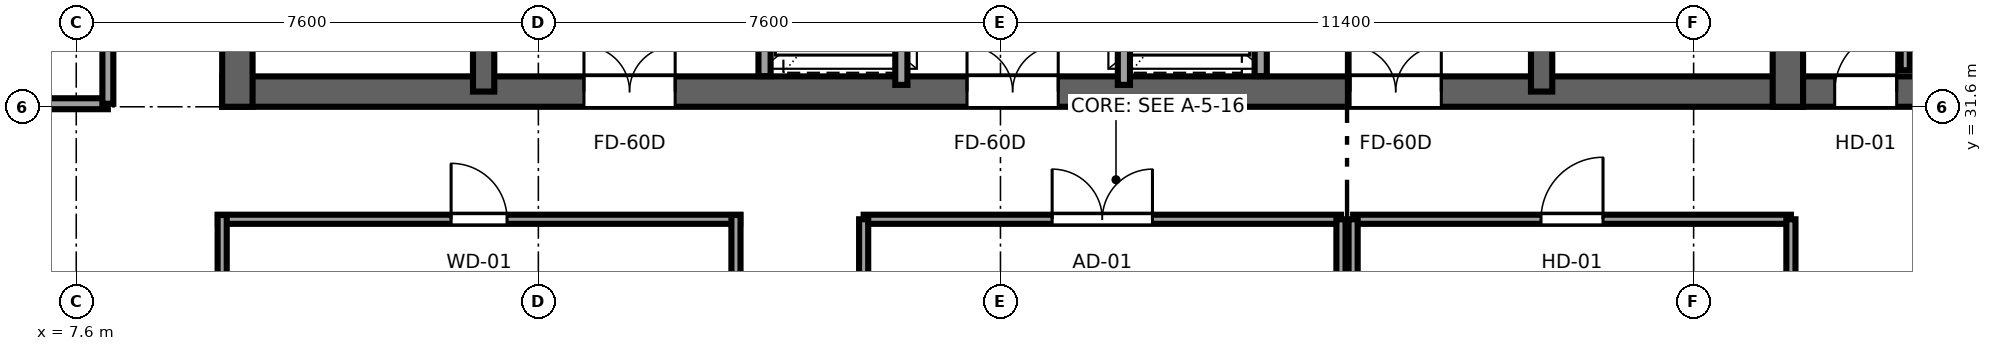
"""IFC4 building model, lengths in metres.
Left out: names, types, materials, properties, quantities, classifications, styles, units other than length and angle.
Written with IfcOpenShell. Run it as: python <this file> out.ifc"""

import sys

from ifc_helpers import new_model, si_unit, direction, frame, frame_2d, origin, place, context, subcontext, project, spatial, rectangle, extrude, source, transform, mapped, element, fill, save


model = new_model("IFC4")
c1 = context("Model", 3, precision=1e-05, world=origin(), true_north=direction((0.0, 1.0)))
c2 = subcontext(c1, "Body", "Model", "MODEL_VIEW")
j1 = project(units=[si_unit("LENGTHUNIT", "METRE"), si_unit("PLANEANGLEUNIT", "RADIAN")], contexts=[c1])
p1 = place(None, origin())
s1 = spatial("IfcSite", under=j1, at=p1, CompositionType="ELEMENT")
p2 = place(p1, origin())
s2 = spatial("IfcBuilding", under=s1, at=p2, CompositionType="ELEMENT")
p3 = place(p2, frame((0.0, 0.0, 231.0)))
s3 = spatial("IfcBuildingStorey", under=s2, at=p3, CompositionType="ELEMENT", Elevation=231.0)
p4 = place(p3, frame((10.0, 31.85, 0.0), z_axis=(0.0, 0.0, 1.0), x_axis=(1.0, 0.0, 0.0)))
e1 = element("IfcWall", 1, at=p4, inside=s3, PredefinedType="SHEAR", context=c2, shape_type="SweptSolid", body=[
    extrude(rectangle(XDim=26.0, YDim=0.5, at=frame_2d((13.0, 0.0))), origin(), (0.0, 0.0, 1.0), 3.55),
])
p5 = place(p4, frame((7.45, 0.0, 0.0), z_axis=(0.0, 0.0, 1.0), x_axis=(-1.0, 0.0, 0.0)))
e2 = element("IfcOpeningElement", 2, at=p5, cuts=e1, PredefinedType="OPENING", context=c2, shape_type="SweptSolid", body=[
    extrude(rectangle(XDim=1.5, YDim=2.04, at=frame_2d((0.75, 1.02))), frame((0.0, 0.26, 0.0), z_axis=(0.0, -1.0, 0.0), x_axis=(1.0, 0.0, 0.0)), (0.0, 0.0, 1.0), 0.52),
])
p6 = place(p4, frame((13.75, 0.0, 0.0), z_axis=(0.0, 0.0, 1.0), x_axis=(-1.0, 0.0, 0.0)))
e3 = element("IfcOpeningElement", 3, at=p6, cuts=e1, PredefinedType="OPENING", context=c2, shape_type="SweptSolid", body=[
    extrude(rectangle(XDim=1.5, YDim=2.04, at=frame_2d((0.75, 1.02))), frame((0.0, 0.26, 0.0), z_axis=(0.0, -1.0, 0.0), x_axis=(1.0, 0.0, 0.0)), (0.0, 0.0, 1.0), 0.52),
])
p7 = place(p4, frame((20.05, 0.0, 0.0), z_axis=(0.0, 0.0, 1.0), x_axis=(-1.0, 0.0, 0.0)))
e4 = element("IfcOpeningElement", 4, at=p7, cuts=e1, PredefinedType="OPENING", context=c2, shape_type="SweptSolid", body=[
    extrude(rectangle(XDim=1.5, YDim=2.04, at=frame_2d((0.75, 1.02))), frame((0.0, 0.26, 0.0), z_axis=(0.0, -1.0, 0.0), x_axis=(1.0, 0.0, 0.0)), (0.0, 0.0, 1.0), 0.52),
])
for number, where, z_axis, x_axis in (
    (5, (10.25, 31.6, 0.0), (0.0, 0.0, 1.0), (0.0, 1.0, 0.0)),
    (6, (35.75, 31.6, 0.0), (0.0, 0.0, 1.0), (0.0, 1.0, 0.0)),
):
    element("IfcWall", number, at=place(p3, frame(where, z_axis=z_axis, x_axis=x_axis)), inside=s3, PredefinedType="SHEAR", context=c2, shape_type="SweptSolid", body=[
        extrude(rectangle(XDim=13.6, YDim=0.5, at=frame_2d((6.8, 0.0))), origin(), (0.0, 0.0, 1.0), 3.55),
    ])
p8 = place(p3, frame((14.3, 31.85, 0.0), z_axis=(0.0, 0.0, 1.0), x_axis=(0.0, 1.0, 0.0)))
e7 = element("IfcWall", 7, at=p8, inside=s3, PredefinedType="SHEAR", context=c2, shape_type="SweptSolid", body=[
    extrude(rectangle(XDim=13.1, YDim=0.35, at=frame_2d((6.55, 0.0))), origin(), (0.0, 0.0, 1.0), 3.55),
])
p9 = place(p8, frame((0.7, 0.0, 0.0)))
e8 = element("IfcOpeningElement", 8, at=p9, cuts=e7, PredefinedType="OPENING", context=c2, shape_type="SweptSolid", body=[
    extrude(rectangle(XDim=1.1, YDim=2.12, at=frame_2d((0.55, 1.06))), frame((0.0, 0.185, 0.0), z_axis=(0.0, -1.0, 0.0), x_axis=(1.0, 0.0, 0.0)), (0.0, 0.0, 1.0), 0.37),
])
p10 = place(p3, frame((31.7, 31.85, 0.0), z_axis=(0.0, 0.0, 1.0), x_axis=(0.0, 1.0, 0.0)))
e9 = element("IfcWall", 9, at=p10, inside=s3, PredefinedType="SHEAR", context=c2, shape_type="SweptSolid", body=[
    extrude(rectangle(XDim=13.1, YDim=0.35, at=frame_2d((6.55, 0.0))), origin(), (0.0, 0.0, 1.0), 3.55),
])
p11 = place(p10, frame((1.8, 0.0, 0.0), z_axis=(0.0, 0.0, 1.0), x_axis=(-1.0, 0.0, 0.0)))
e10 = element("IfcOpeningElement", 10, at=p11, cuts=e9, PredefinedType="OPENING", context=c2, shape_type="SweptSolid", body=[
    extrude(rectangle(XDim=1.1, YDim=2.12, at=frame_2d((0.55, 1.06))), frame((0.0, 0.185, 0.0), z_axis=(0.0, -1.0, 0.0), x_axis=(1.0, 0.0, 0.0)), (0.0, 0.0, 1.0), 0.37),
])
p12 = place(p3, frame((36.0, 31.85, 0.0), z_axis=(0.0, 0.0, 1.0), x_axis=(1.0, 0.0, 0.0)))
e11 = element("IfcWall", 11, at=p12, inside=s3, PredefinedType="SHEAR", context=c2, shape_type="SweptSolid", body=[
    extrude(rectangle(XDim=3.8, YDim=0.5, at=frame_2d((1.9, 0.0))), origin(), (0.0, 0.0, 1.0), 3.55),
])
p13 = place(p12, frame((1.54, 0.0, 0.0), z_axis=(0.0, 0.0, 1.0), x_axis=(-1.0, 0.0, 0.0)))
e12 = element("IfcOpeningElement", 12, at=p13, cuts=e11, PredefinedType="OPENING", context=c2, shape_type="SweptSolid", body=[
    extrude(rectangle(XDim=1.02, YDim=2.03, at=frame_2d((0.51, 1.015))), frame((0.0, 0.26, 0.0), z_axis=(0.0, -1.0, 0.0), x_axis=(1.0, 0.0, 0.0)), (0.0, 0.0, 1.0), 0.52),
])
for number, where, z_axis, x_axis in (
    (13, (18.92, 32.104, 0.0), (0.0, 0.0, 1.0), (0.0, 1.0, 0.0)),
    (14, (27.08, 32.104, 0.0), (0.0, 0.0, 1.0), (0.0, 1.0, 0.0)),
):
    element("IfcWall", number, at=place(p3, frame(where, z_axis=z_axis, x_axis=x_axis)), inside=s3, PredefinedType="SOLIDWALL", context=c2, shape_type="SweptSolid", body=[
        extrude(rectangle(XDim=4.046, YDim=0.2, at=frame_2d((2.023, 0.0))), origin(), (0.0, 0.0, 1.0), 3.37),
    ])
p14 = place(p3, frame((21.17, 31.96, 0.0), z_axis=(0.0, 0.0, 1.0), x_axis=(0.0, 1.0, 0.0)))
e15 = element("IfcWall", 15, at=p14, inside=s3, PredefinedType="SOLIDWALL", context=c2, shape_type="SweptSolid", body=[
    extrude(rectangle(XDim=5.08, YDim=0.2, at=frame_2d((2.54, 0.0))), origin(), (0.0, 0.0, 1.0), 3.37),
])
p15 = place(p14, frame((0.74, 0.0, 0.0)))
e16 = element("IfcOpeningElement", 16, at=p15, cuts=e15, PredefinedType="OPENING", context=c2, shape_type="SweptSolid", body=[
    extrude(rectangle(XDim=1.1, YDim=2.12, at=frame_2d((0.55, 1.06))), frame((0.0, 0.11, 0.0), z_axis=(0.0, -1.0, 0.0), x_axis=(1.0, 0.0, 0.0)), (0.0, 0.0, 1.0), 0.22),
])
p16 = place(p14, frame((3.24, 0.0, 0.0)))
e17 = element("IfcOpeningElement", 17, at=p16, cuts=e15, PredefinedType="OPENING", context=c2, shape_type="SweptSolid", body=[
    extrude(rectangle(XDim=1.1, YDim=2.12, at=frame_2d((0.55, 1.06))), frame((0.0, 0.11, 0.0), z_axis=(0.0, -1.0, 0.0), x_axis=(1.0, 0.0, 0.0)), (0.0, 0.0, 1.0), 0.22),
])
p17 = place(p3, frame((24.83, 31.96, 0.0), z_axis=(0.0, 0.0, 1.0), x_axis=(0.0, 1.0, 0.0)))
e18 = element("IfcWall", 18, at=p17, inside=s3, PredefinedType="SOLIDWALL", context=c2, shape_type="SweptSolid", body=[
    extrude(rectangle(XDim=5.08, YDim=0.2, at=frame_2d((2.54, 0.0))), origin(), (0.0, 0.0, 1.0), 3.37),
])
p18 = place(p17, frame((0.74, 0.0, 0.0)))
e19 = element("IfcOpeningElement", 19, at=p18, cuts=e18, PredefinedType="OPENING", context=c2, shape_type="SweptSolid", body=[
    extrude(rectangle(XDim=1.1, YDim=2.12, at=frame_2d((0.55, 1.06))), frame((0.0, 0.11, 0.0), z_axis=(0.0, -1.0, 0.0), x_axis=(1.0, 0.0, 0.0)), (0.0, 0.0, 1.0), 0.22),
])
p19 = place(p17, frame((3.24, 0.0, 0.0)))
e20 = element("IfcOpeningElement", 20, at=p19, cuts=e18, PredefinedType="OPENING", context=c2, shape_type="SweptSolid", body=[
    extrude(rectangle(XDim=1.1, YDim=2.12, at=frame_2d((0.55, 1.06))), frame((0.0, 0.11, 0.0), z_axis=(0.0, -1.0, 0.0), x_axis=(1.0, 0.0, 0.0)), (0.0, 0.0, 1.0), 0.22),
])
p20 = place(p3, frame((37.68, 32.2, 0.0), z_axis=(0.0, 0.0, 1.0), x_axis=(0.0, 1.0, 0.0)))
e21 = element("IfcWall", 21, at=p20, inside=s3, PredefinedType="PARTITIONING", context=c2, shape_type="SweptSolid", body=[
    extrude(rectangle(XDim=4.0, YDim=0.15, at=frame_2d((2.0, 0.0))), origin(), (0.0, 0.0, 1.0), 3.37),
])
p21 = place(p20, frame((1.49, 0.0, 0.0)))
e22 = element("IfcOpeningElement", 22, at=p21, cuts=e21, PredefinedType="OPENING", context=c2, shape_type="SweptSolid", body=[
    extrude(rectangle(XDim=1.02, YDim=2.03, at=frame_2d((0.51, 1.015))), frame((0.0, 0.085, 0.0), z_axis=(0.0, -1.0, 0.0), x_axis=(1.0, 0.0, 0.0)), (0.0, 0.0, 1.0), 0.17),
])
p22 = place(p3, frame((3.005, 31.65, 0.0), z_axis=(0.0, 0.0, 1.0), x_axis=(1.0, 0.0, 0.0)))
e23 = element("IfcWall", 23, at=p22, inside=s3, PredefinedType="PARTITIONING", context=c2, shape_type="SweptSolid", body=[
    extrude(rectangle(XDim=5.115, YDim=0.18, at=frame_2d((2.558, 0.0))), origin(), (0.0, 0.0, 1.0), 3.37),
])
p23 = place(p3, frame((8.12, 31.65, 0.0), z_axis=(0.0, 0.0, 1.0), x_axis=(0.0, 1.0, 0.0)))
e24 = element("IfcWall", 24, at=p23, inside=s3, PredefinedType="PARTITIONING", context=c2, shape_type="SweptSolid", body=[
    extrude(rectangle(XDim=4.95, YDim=0.18, at=frame_2d((2.475, 0.0))), origin(), (0.0, 0.0, 1.0), 3.37),
])
p24 = place(p23, frame((3.0, 0.0, 0.0)))
e25 = element("IfcOpeningElement", 25, at=p24, cuts=e24, PredefinedType="OPENING", context=c2, shape_type="SweptSolid", body=[
    extrude(rectangle(XDim=1.65, YDim=2.15, at=frame_2d((0.825, 1.075))), frame((0.0, 0.1, 0.0), z_axis=(0.0, -1.0, 0.0), x_axis=(1.0, 0.0, 0.0)), (0.0, 0.0, 1.0), 0.2),
])
p25 = place(p3, frame((9.93, 29.75, 0.0), z_axis=(0.0, 0.0, 1.0), x_axis=(1.0, 0.0, 0.0)))
e26 = element("IfcWall", 26, at=p25, inside=s3, PredefinedType="PARTITIONING", context=c2, shape_type="SweptSolid", body=[
    extrude(rectangle(XDim=8.59, YDim=0.15, at=frame_2d((4.295, 0.0))), origin(), (0.0, 0.0, 1.0), 3.37),
])
p26 = place(p25, frame((3.835, 0.0, 0.0)))
e27 = element("IfcOpeningElement", 27, at=p26, cuts=e26, PredefinedType="OPENING", context=c2, shape_type="SweptSolid", body=[
    extrude(rectangle(XDim=0.92, YDim=2.01, at=frame_2d((0.46, 1.005))), frame((0.0, 0.085, 0.0), z_axis=(0.0, -1.0, 0.0), x_axis=(1.0, 0.0, 0.0)), (0.0, 0.0, 1.0), 0.17),
])
for number, where, z_axis, x_axis in (
    (28, (10.0, 27.03, 0.0), (0.0, 0.0, 1.0), (0.0, 1.0, 0.0)),
    (29, (18.45, 27.03, 0.0), (0.0, 0.0, 1.0), (0.0, 1.0, 0.0)),
):
    element("IfcWall", number, at=place(p3, frame(where, z_axis=z_axis, x_axis=x_axis)), inside=s3, PredefinedType="PARTITIONING", context=c2, shape_type="SweptSolid", body=[
        extrude(rectangle(XDim=2.79, YDim=0.15, at=frame_2d((1.395, 0.0))), origin(), (0.0, 0.0, 1.0), 3.37),
    ])
p27 = place(p3, frame((20.55, 29.75, 0.0), z_axis=(0.0, 0.0, 1.0), x_axis=(1.0, 0.0, 0.0)))
e30 = element("IfcWall", 30, at=p27, inside=s3, PredefinedType="PARTITIONING", context=c2, shape_type="SweptSolid", body=[
    extrude(rectangle(XDim=7.85, YDim=0.15, at=frame_2d((3.925, 0.0))), origin(), (0.0, 0.0, 1.0), 3.37),
])
p28 = place(p27, frame((3.1, 0.0, 0.0)))
e31 = element("IfcOpeningElement", 31, at=p28, cuts=e30, PredefinedType="OPENING", context=c2, shape_type="SweptSolid", body=[
    extrude(rectangle(XDim=1.65, YDim=2.15, at=frame_2d((0.825, 1.075))), frame((0.0, 0.085, 0.0), z_axis=(0.0, -1.0, 0.0), x_axis=(1.0, 0.0, 0.0)), (0.0, 0.0, 1.0), 0.17),
])
p29 = place(p3, frame((20.55, 25.0, 0.0), z_axis=(0.0, 0.0, 1.0), x_axis=(0.0, 1.0, 0.0)))
e32 = element("IfcWall", 32, at=p29, inside=s3, PredefinedType="PARTITIONING", context=c2, shape_type="SweptSolid", body=[
    extrude(rectangle(XDim=4.75, YDim=0.15, at=frame_2d((2.375, 0.0))), origin(), (0.0, 0.0, 1.0), 3.37),
])
p30 = place(p3, frame((28.4, 25.0, 0.0), z_axis=(0.0, 0.0, 1.0), x_axis=(0.0, 1.0, 0.0)))
e33 = element("IfcWall", 33, at=p30, inside=s3, PredefinedType="PARTITIONING", context=c2, shape_type="SweptSolid", body=[
    extrude(rectangle(XDim=4.75, YDim=0.15, at=frame_2d((2.375, 0.0))), origin(), (0.0, 0.0, 1.0), 2.758),
])
p31 = place(p3, frame((28.6, 29.75, 0.0), z_axis=(0.0, 0.0, 1.0), x_axis=(1.0, 0.0, 0.0)))
e34 = element("IfcWall", 34, at=p31, inside=s3, PredefinedType="PARTITIONING", context=c2, shape_type="SweptSolid", body=[
    extrude(rectangle(XDim=7.2, YDim=0.15, at=frame_2d((3.6, 0.0))), origin(), (0.0, 0.0, 1.0), 3.37),
])
p32 = place(p31, frame((3.09, 0.0, 0.0)))
e35 = element("IfcOpeningElement", 35, at=p32, cuts=e34, PredefinedType="OPENING", context=c2, shape_type="SweptSolid", body=[
    extrude(rectangle(XDim=1.02, YDim=2.03, at=frame_2d((0.51, 1.015))), frame((0.0, 0.085, 0.0), z_axis=(0.0, -1.0, 0.0), x_axis=(1.0, 0.0, 0.0)), (0.0, 0.0, 1.0), 0.17),
])
p33 = place(p3, frame((28.6, 25.0, 0.0), z_axis=(0.0, 0.0, 1.0), x_axis=(0.0, 1.0, 0.0)))
e36 = element("IfcWall", 36, at=p33, inside=s3, PredefinedType="PARTITIONING", context=c2, shape_type="SweptSolid", body=[
    extrude(rectangle(XDim=4.75, YDim=0.15, at=frame_2d((2.375, 0.0))), origin(), (0.0, 0.0, 1.0), 2.758),
])
p34 = place(p3, frame((35.8, 25.0, 0.0), z_axis=(0.0, 0.0, 1.0), x_axis=(0.0, 1.0, 0.0)))
e37 = element("IfcWall", 37, at=p34, inside=s3, PredefinedType="PARTITIONING", context=c2, shape_type="SweptSolid", body=[
    extrude(rectangle(XDim=4.75, YDim=0.15, at=frame_2d((2.375, 0.0))), origin(), (0.0, 0.0, 1.0), 3.37),
])
m1 = source(origin(), c2, "Body", "SweptSolid", [
    extrude(rectangle(XDim=1.5, YDim=2.04, at=frame_2d((0.75, 1.02))), frame((0.0, 0.025, 0.0), z_axis=(0.0, -1.0, 0.0), x_axis=(1.0, 0.0, 0.0)), (0.0, 0.0, 1.0), 0.05),
])
p35 = place(p5, origin())
e38 = element("IfcDoor", 38, at=p35, inside=s3, OperationType="DOUBLE_DOOR_SINGLE_SWING", PredefinedType="DOOR", context=c2, shape_type="MappedRepresentation", body=[
    mapped(m1, transform((0.0, 0.0, 0.0), x_axis=(1.0, 0.0, 0.0), y_axis=(0.0, 1.0, 0.0), z_axis=(0.0, 0.0, 1.0), scale=1.0)),
])
fill(e2, e38)
p36 = place(p6, origin())
e39 = element("IfcDoor", 39, at=p36, inside=s3, OperationType="DOUBLE_DOOR_SINGLE_SWING", PredefinedType="DOOR", context=c2, shape_type="MappedRepresentation", body=[
    mapped(m1, transform((0.0, 0.0, 0.0), x_axis=(1.0, 0.0, 0.0), y_axis=(0.0, 1.0, 0.0), z_axis=(0.0, 0.0, 1.0), scale=1.0)),
])
fill(e3, e39)
p37 = place(p7, origin())
e40 = element("IfcDoor", 40, at=p37, inside=s3, OperationType="DOUBLE_DOOR_SINGLE_SWING", PredefinedType="DOOR", context=c2, shape_type="MappedRepresentation", body=[
    mapped(m1, transform((0.0, 0.0, 0.0), x_axis=(1.0, 0.0, 0.0), y_axis=(0.0, 1.0, 0.0), z_axis=(0.0, 0.0, 1.0), scale=1.0)),
])
fill(e4, e40)
m2 = source(origin(), c2, "Body", "SweptSolid", [
    extrude(rectangle(XDim=1.02, YDim=2.03, at=frame_2d((0.51, 1.015))), frame((0.0, 0.025, 0.0), z_axis=(0.0, -1.0, 0.0), x_axis=(1.0, 0.0, 0.0)), (0.0, 0.0, 1.0), 0.05),
])
p38 = place(p13, origin())
e41 = element("IfcDoor", 41, at=p38, inside=s3, OperationType="SINGLE_SWING_RIGHT", PredefinedType="DOOR", context=c2, shape_type="MappedRepresentation", body=[
    mapped(m2, transform((0.0, 0.0, 0.0), x_axis=(1.0, 0.0, 0.0), y_axis=(0.0, 1.0, 0.0), z_axis=(0.0, 0.0, 1.0), scale=1.0)),
])
fill(e12, e41)
m3 = source(origin(), c2, "Body", "SweptSolid", [
    extrude(rectangle(XDim=0.92, YDim=2.01, at=frame_2d((0.46, 1.005))), frame((0.0, 0.025, 0.0), z_axis=(0.0, -1.0, 0.0), x_axis=(1.0, 0.0, 0.0)), (0.0, 0.0, 1.0), 0.05),
])
p39 = place(p26, origin())
e42 = element("IfcDoor", 42, at=p39, inside=s3, OperationType="SINGLE_SWING_LEFT", PredefinedType="DOOR", context=c2, shape_type="MappedRepresentation", body=[
    mapped(m3, transform((0.0, 0.0, 0.0), x_axis=(1.0, 0.0, 0.0), y_axis=(0.0, 1.0, 0.0), z_axis=(0.0, 0.0, 1.0), scale=1.0)),
])
fill(e27, e42)
m4 = source(origin(), c2, "Body", "SweptSolid", [
    extrude(rectangle(XDim=1.65, YDim=2.15, at=frame_2d((0.825, 1.075))), frame((0.0, 0.025, 0.0), z_axis=(0.0, -1.0, 0.0), x_axis=(1.0, 0.0, 0.0)), (0.0, 0.0, 1.0), 0.05),
])
p40 = place(p28, origin())
e43 = element("IfcDoor", 43, at=p40, inside=s3, OperationType="DOUBLE_DOOR_SINGLE_SWING", PredefinedType="DOOR", context=c2, shape_type="MappedRepresentation", body=[
    mapped(m4, transform((0.0, 0.0, 0.0), x_axis=(1.0, 0.0, 0.0), y_axis=(0.0, 1.0, 0.0), z_axis=(0.0, 0.0, 1.0), scale=1.0)),
])
fill(e31, e43)
p41 = place(p32, origin())
e44 = element("IfcDoor", 44, at=p41, inside=s3, OperationType="SINGLE_SWING_RIGHT", PredefinedType="DOOR", context=c2, shape_type="MappedRepresentation", body=[
    mapped(m2, transform((0.0, 0.0, 0.0), x_axis=(1.0, 0.0, 0.0), y_axis=(0.0, 1.0, 0.0), z_axis=(0.0, 0.0, 1.0), scale=1.0)),
])
fill(e35, e44)
save(model, sys.argv[1])
